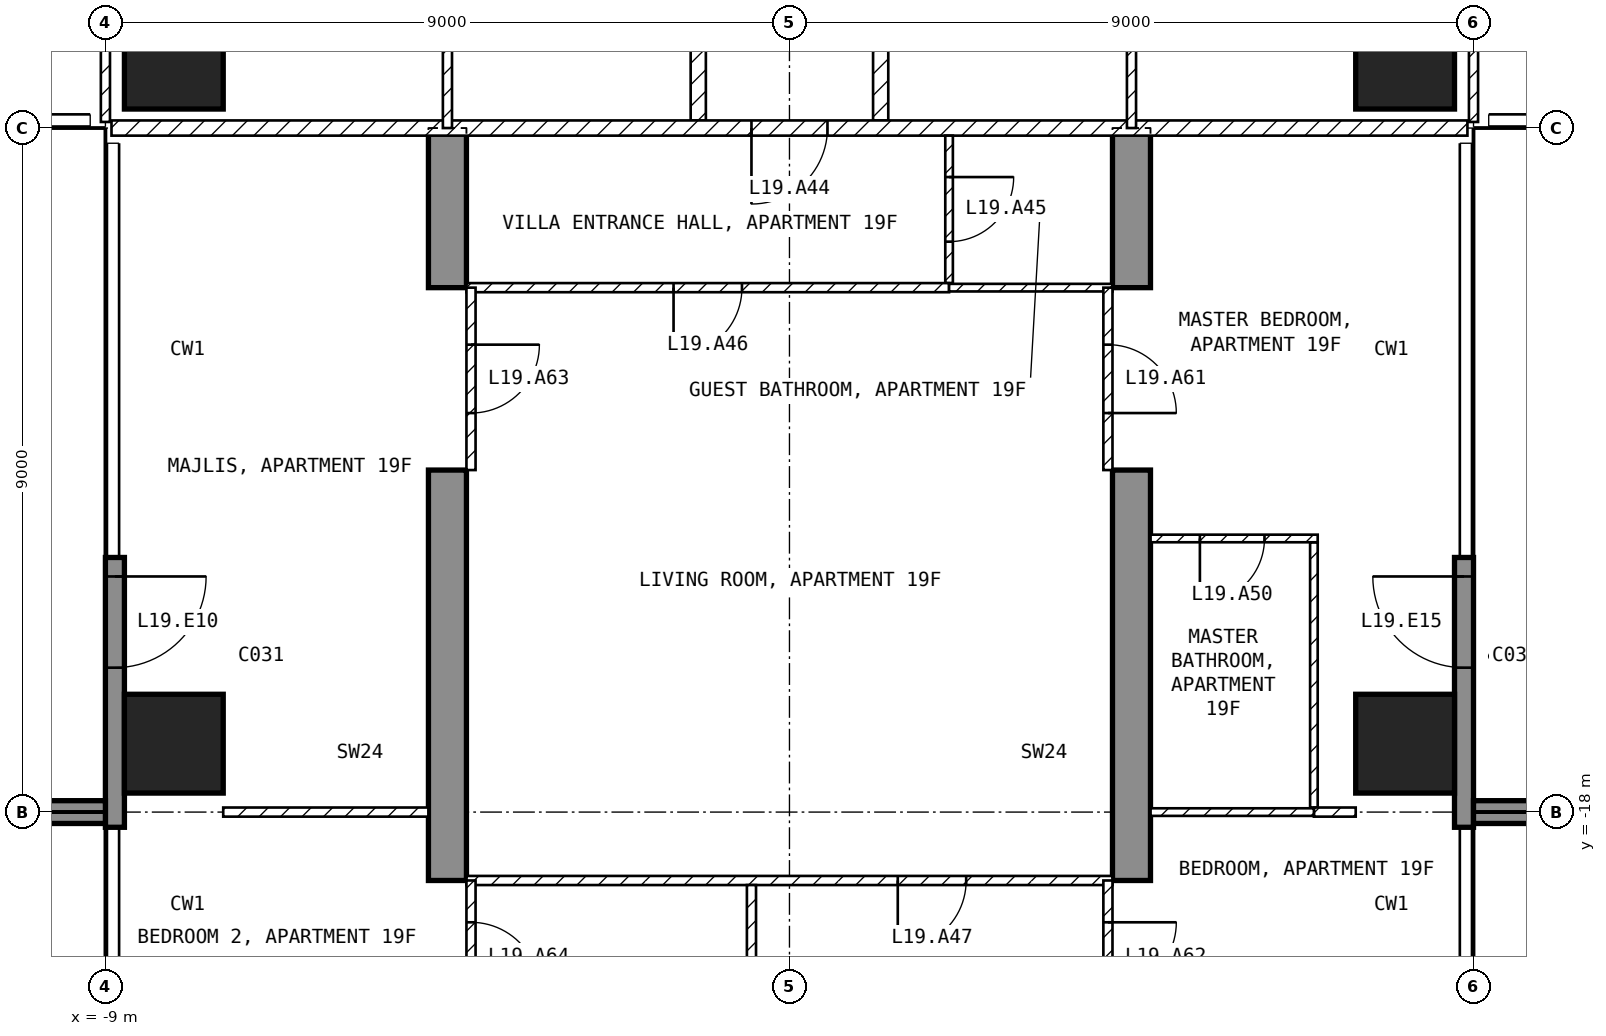
"""IFC4 building model, lengths in metres.
Left out: names, types, materials, properties, quantities, classifications, styles, units other than length and angle.
Written with IfcOpenShell. Run it as: python <this file> out.ifc"""

import sys

from ifc_helpers import new_model, si_unit, direction, frame, frame_2d, origin, origin_2d, place, context, subcontext, project, spatial, polyline, rectangle, outline, extrude, element, fill, save


model = new_model("IFC4")
c1 = context("Model", 3, precision=1e-05, world=origin(), true_north=direction((0.0, 1.0)))
c2 = subcontext(c1, "Body", "Model", "MODEL_VIEW")
j1 = project(units=[si_unit("LENGTHUNIT", "METRE"), si_unit("PLANEANGLEUNIT", "RADIAN")], contexts=[c1])
p1 = place(None, origin())
s1 = spatial("IfcSite", under=j1, at=p1, CompositionType="ELEMENT")
p2 = place(p1, origin())
s2 = spatial("IfcBuilding", under=s1, at=p2, CompositionType="ELEMENT")
p3 = place(p2, frame((0.0, 0.0, 85.5)))
s3 = spatial("IfcBuildingStorey", under=s2, at=p3, CompositionType="ELEMENT", Elevation=85.5)
for number, where, z_axis, x_axis in (
    (1, (-8.1, -17.1, -0.25), (0.0, 0.0, 1.0), (1.0, 0.0, 0.0)),
    (2, (-8.1, -8.1, -0.25), (0.0, 0.0, 1.0), (1.0, 0.0, 0.0)),
    (3, (8.1, -17.1, -0.25), (0.0, 0.0, 1.0), (1.0, 0.0, 0.0)),
    (4, (8.1, -8.1, -0.25), (0.0, 0.0, 1.0), (1.0, 0.0, 0.0)),
):
    element("IfcColumn", number, at=place(p3, frame(where, z_axis=z_axis, x_axis=x_axis)), inside=s3, PredefinedType="COLUMN", context=c2, shape_type="SweptSolid", body=[
        extrude(rectangle(XDim=1.3, YDim=1.3, at=origin_2d()), origin(), (0.0, 0.0, 1.0), 3.5),
    ])
for number, where, z_axis, x_axis in (
    (5, (-4.75, -25.45, -0.25), (1.0, 0.0, 0.0), (0.0, 1.0, 0.0)),
    (6, (4.25, -25.45, -0.25), (1.0, 0.0, 0.0), (0.0, 1.0, 0.0)),
):
    element("IfcWall", number, at=place(p3, frame(where, z_axis=z_axis, x_axis=x_axis)), inside=s3, PredefinedType="SHEAR", context=c2, shape_type="SweptSolid", body=[
        extrude(outline(polyline([(0.0, 0.0), (4.15, 0.0), (4.15, 2.65), (6.55, 2.65), (6.55, 0.0), (11.95, 0.0), (11.95, 2.65), (14.35, 2.65), (14.35, 0.0), (16.45, 0.0), (16.45, 3.5), (0.0, 3.5), (0.0, 0.0)])), origin(), (0.0, 0.0, 1.0), 0.5),
    ])
p4 = place(p3, frame((-8.875, -14.65, 0.0), z_axis=(0.0, 0.0, 1.0), x_axis=(0.0, -1.0, 0.0)))
e7 = element("IfcWall", 7, at=p4, inside=s3, PredefinedType="SOLIDWALL", context=c2, shape_type="SweptSolid", body=[
    extrude(rectangle(XDim=3.55, YDim=0.25, at=frame_2d((1.775, 0.0))), origin(), (0.0, 0.0, 1.0), 3.25),
])
p5 = place(p4, frame((0.25, 0.0, 0.0)))
e8 = element("IfcOpeningElement", 8, at=p5, cuts=e7, PredefinedType="OPENING", context=c2, shape_type="SweptSolid", body=[
    extrude(rectangle(XDim=1.2, YDim=2.4, at=frame_2d((0.6, 1.2))), frame((0.0, 0.135, 0.0), z_axis=(0.0, -1.0, 0.0), x_axis=(1.0, 0.0, 0.0)), (0.0, 0.0, 1.0), 0.27),
])
p6 = place(p3, frame((8.875, -18.2, 0.0), z_axis=(0.0, 0.0, 1.0), x_axis=(0.0, 1.0, 0.0)))
e9 = element("IfcWall", 9, at=p6, inside=s3, PredefinedType="SOLIDWALL", context=c2, shape_type="SweptSolid", body=[
    extrude(rectangle(XDim=3.55, YDim=0.25, at=frame_2d((1.775, 0.0))), origin(), (0.0, 0.0, 1.0), 3.25),
])
p7 = place(p6, frame((2.1, 0.0, 0.0)))
e10 = element("IfcOpeningElement", 10, at=p7, cuts=e9, PredefinedType="OPENING", context=c2, shape_type="SweptSolid", body=[
    extrude(rectangle(XDim=1.2, YDim=2.4, at=frame_2d((0.6, 1.2))), frame((0.0, 0.135, 0.0), z_axis=(0.0, -1.0, 0.0), x_axis=(1.0, 0.0, 0.0)), (0.0, 0.0, 1.0), 0.27),
])
for number, where, z_axis, x_axis in (
    (11, (-9.0, -18.0, 0.0), (0.0, 0.0, 1.0), (-1.0, 0.0, 0.0)),
    (12, (9.0, -18.0, 0.0), (0.0, 0.0, 1.0), (1.0, 0.0, 0.0)),
):
    element("IfcWall", number, at=place(p3, frame(where, z_axis=z_axis, x_axis=x_axis)), inside=s3, PredefinedType="SOLIDWALL", context=c2, shape_type="SweptSolid", body=[
        extrude(rectangle(XDim=2.7, YDim=0.3, at=frame_2d((1.35, 0.0))), origin(), (0.0, 0.0, 1.0), 3.25),
    ])
for number, where, z_axis, x_axis in (
    (13, (1.2, -1.3, 0.0), (0.0, 0.0, 1.0), (0.0, -1.0, 0.0)),
    (14, (-1.2, -8.9, 0.0), (0.0, 0.0, 1.0), (0.0, 1.0, 0.0)),
):
    element("IfcWall", number, at=place(p3, frame(where, z_axis=z_axis, x_axis=x_axis)), inside=s3, PredefinedType="PARTITIONING", context=c2, shape_type="SweptSolid", body=[
        extrude(rectangle(XDim=7.6, YDim=0.2, at=frame_2d((3.8, 0.0))), origin(), (0.0, 0.0, 1.0), 3.25),
    ])
p8 = place(p3, frame((8.92, -9.0, 0.0), z_axis=(0.0, 0.0, 1.0), x_axis=(-1.0, 0.0, 0.0)))
e15 = element("IfcWall", 15, at=p8, inside=s3, PredefinedType="PARTITIONING", context=c2, shape_type="SweptSolid", body=[
    extrude(rectangle(XDim=17.84, YDim=0.2, at=frame_2d((8.92, 0.0))), origin(), (0.0, 0.0, 1.0), 3.25),
])
p9 = place(p8, frame((8.42, 0.0, 0.0)))
e16 = element("IfcOpeningElement", 16, at=p9, cuts=e15, PredefinedType="OPENING", context=c2, shape_type="SweptSolid", body=[
    extrude(rectangle(XDim=1.0, YDim=2.1, at=frame_2d((0.5, 1.05))), frame((0.0, 0.11, 0.0), z_axis=(0.0, -1.0, 0.0), x_axis=(1.0, 0.0, 0.0)), (0.0, 0.0, 1.0), 0.22),
])
p10 = place(p3, frame((9.0, -8.92, 0.0), z_axis=(0.0, 0.0, 1.0), x_axis=(0.0, 1.0, 0.0)))
e17 = element("IfcWall", 17, at=p10, inside=s3, PredefinedType="PARTITIONING", context=c2, shape_type="SweptSolid", body=[
    extrude(rectangle(XDim=7.62, YDim=0.12, at=frame_2d((3.81, 0.0))), origin(), (0.0, 0.0, 1.0), 3.25),
])
p11 = place(p10, frame((5.72, 0.0, 0.0)))
e18 = element("IfcOpeningElement", 18, at=p11, cuts=e17, PredefinedType="OPENING", context=c2, shape_type="SweptSolid", body=[
    extrude(rectangle(XDim=0.9, YDim=2.1, at=frame_2d((0.45, 1.05))), frame((0.0, 0.07, 0.0), z_axis=(0.0, -1.0, 0.0), x_axis=(1.0, 0.0, 0.0)), (0.0, 0.0, 1.0), 0.14),
])
p12 = place(p10, frame((2.682, 0.0, 0.0)))
e19 = element("IfcOpeningElement", 19, at=p12, cuts=e17, PredefinedType="OPENING", context=c2, shape_type="SweptSolid", body=[
    extrude(rectangle(XDim=0.9, YDim=2.1, at=frame_2d((0.45, 1.05))), frame((0.0, 0.07, 0.0), z_axis=(0.0, -1.0, 0.0), x_axis=(1.0, 0.0, 0.0)), (0.0, 0.0, 1.0), 0.14),
])
p13 = place(p3, frame((4.5, -9.0, 0.0), z_axis=(0.0, 0.0, 1.0), x_axis=(0.0, 1.0, 0.0)))
e20 = element("IfcWall", 20, at=p13, inside=s3, PredefinedType="PARTITIONING", context=c2, shape_type="SweptSolid", body=[
    extrude(rectangle(XDim=7.7, YDim=0.12, at=frame_2d((3.85, 0.0))), origin(), (0.0, 0.0, 1.0), 3.25),
])
p14 = place(p13, frame((1.812, 0.0, 0.0)))
e21 = element("IfcOpeningElement", 21, at=p14, cuts=e20, PredefinedType="OPENING", context=c2, shape_type="SweptSolid", body=[
    extrude(rectangle(XDim=0.9, YDim=2.1, at=frame_2d((0.45, 1.05))), frame((0.0, 0.07, 0.0), z_axis=(0.0, -1.0, 0.0), x_axis=(1.0, 0.0, 0.0)), (0.0, 0.0, 1.0), 0.14),
])
p15 = place(p3, frame((-9.0, -1.3, 0.0), z_axis=(0.0, 0.0, 1.0), x_axis=(0.0, -1.0, 0.0)))
e22 = element("IfcWall", 22, at=p15, inside=s3, PredefinedType="PARTITIONING", context=c2, shape_type="SweptSolid", body=[
    extrude(rectangle(XDim=7.62, YDim=0.12, at=frame_2d((3.81, 0.0))), origin(), (0.0, 0.0, 1.0), 3.25),
])
p16 = place(p15, frame((4.17, 0.0, 0.0)))
e23 = element("IfcOpeningElement", 23, at=p16, cuts=e22, PredefinedType="OPENING", context=c2, shape_type="SweptSolid", body=[
    extrude(rectangle(XDim=0.9, YDim=2.1, at=frame_2d((0.45, 1.05))), frame((0.0, 0.07, 0.0), z_axis=(0.0, -1.0, 0.0), x_axis=(1.0, 0.0, 0.0)), (0.0, 0.0, 1.0), 0.14),
])
p17 = place(p3, frame((-4.5, -1.3, 0.0), z_axis=(0.0, 0.0, 1.0), x_axis=(0.0, -1.0, 0.0)))
e24 = element("IfcWall", 24, at=p17, inside=s3, PredefinedType="PARTITIONING", context=c2, shape_type="SweptSolid", body=[
    extrude(rectangle(XDim=7.7, YDim=0.12, at=frame_2d((3.85, 0.0))), origin(), (0.0, 0.0, 1.0), 3.25),
])
p18 = place(p17, frame((4.988, 0.0, 0.0)))
e25 = element("IfcOpeningElement", 25, at=p18, cuts=e24, PredefinedType="OPENING", context=c2, shape_type="SweptSolid", body=[
    extrude(rectangle(XDim=0.9, YDim=2.1, at=frame_2d((0.45, 1.05))), frame((0.0, 0.07, 0.0), z_axis=(0.0, -1.0, 0.0), x_axis=(1.0, 0.0, 0.0)), (0.0, 0.0, 1.0), 0.14),
])
p19 = place(p3, frame((2.1, -9.1, 0.0), z_axis=(0.0, 0.0, 1.0), x_axis=(0.0, -1.0, 0.0)))
e26 = element("IfcWall", 26, at=p19, inside=s3, PredefinedType="PARTITIONING", context=c2, shape_type="SweptSolid", body=[
    extrude(rectangle(XDim=1.94, YDim=0.1, at=frame_2d((0.97, 0.0))), origin(), (0.0, 0.0, 1.0), 3.25),
])
p20 = place(p19, frame((0.545, 0.0, 0.0)))
e27 = element("IfcOpeningElement", 27, at=p20, cuts=e26, PredefinedType="OPENING", context=c2, shape_type="SweptSolid", body=[
    extrude(rectangle(XDim=0.85, YDim=2.1, at=frame_2d((0.425, 1.05))), frame((0.0, 0.06, 0.0), z_axis=(0.0, -1.0, 0.0), x_axis=(1.0, 0.0, 0.0)), (0.0, 0.0, 1.0), 0.12),
])
p21 = place(p3, frame((2.1, -11.1, 0.0), z_axis=(0.0, 0.0, 1.0), x_axis=(-1.0, 0.0, 0.0)))
e28 = element("IfcWall", 28, at=p21, inside=s3, PredefinedType="PARTITIONING", context=c2, shape_type="SweptSolid", body=[
    extrude(rectangle(XDim=6.35, YDim=0.12, at=frame_2d((3.175, 0.0))), origin(), (0.0, 0.0, 1.0), 3.25),
])
p22 = place(p21, frame((2.725, 0.0, 0.0)))
e29 = element("IfcOpeningElement", 29, at=p22, cuts=e28, PredefinedType="OPENING", context=c2, shape_type="SweptSolid", body=[
    extrude(rectangle(XDim=0.9, YDim=2.1, at=frame_2d((0.45, 1.05))), frame((0.0, 0.07, 0.0), z_axis=(0.0, -1.0, 0.0), x_axis=(1.0, 0.0, 0.0)), (0.0, 0.0, 1.0), 0.14),
])
p23 = place(p3, frame((4.25, -11.1, 0.0), z_axis=(0.0, 0.0, 1.0), x_axis=(-1.0, 0.0, 0.0)))
e30 = element("IfcWall", 30, at=p23, inside=s3, PredefinedType="PARTITIONING", context=c2, shape_type="SweptSolid", body=[
    extrude(rectangle(XDim=2.15, YDim=0.1, at=frame_2d((1.075, 0.0))), origin(), (0.0, 0.0, 1.0), 3.25),
])
p24 = place(p3, frame((4.25, -18.9, 0.0), z_axis=(0.0, 0.0, 1.0), x_axis=(-1.0, 0.0, 0.0)))
e31 = element("IfcWall", 31, at=p24, inside=s3, PredefinedType="PARTITIONING", context=c2, shape_type="SweptSolid", body=[
    extrude(rectangle(XDim=8.5, YDim=0.12, at=frame_2d((4.25, 0.0))), origin(), (0.0, 0.0, 1.0), 3.25),
])
p25 = place(p24, frame((1.925, 0.0, 0.0)))
e32 = element("IfcOpeningElement", 32, at=p25, cuts=e31, PredefinedType="OPENING", context=c2, shape_type="SweptSolid", body=[
    extrude(rectangle(XDim=0.9, YDim=2.1, at=frame_2d((0.45, 1.05))), frame((0.0, 0.07, 0.0), z_axis=(0.0, -1.0, 0.0), x_axis=(1.0, 0.0, 0.0)), (0.0, 0.0, 1.0), 0.14),
])
p26 = place(p3, frame((-0.5, -23.34, 0.0), z_axis=(0.0, 0.0, 1.0), x_axis=(0.0, 1.0, 0.0)))
e33 = element("IfcWall", 33, at=p26, inside=s3, PredefinedType="PARTITIONING", context=c2, shape_type="SweptSolid", body=[
    extrude(rectangle(XDim=4.38, YDim=0.12, at=frame_2d((2.19, 0.0))), origin(), (0.0, 0.0, 1.0), 3.25),
])
p27 = place(p26, frame((1.74, 0.0, 0.0)))
e34 = element("IfcOpeningElement", 34, at=p27, cuts=e33, PredefinedType="OPENING", context=c2, shape_type="SweptSolid", body=[
    extrude(rectangle(XDim=0.9, YDim=2.1, at=frame_2d((0.45, 1.05))), frame((0.0, 0.07, 0.0), z_axis=(0.0, -1.0, 0.0), x_axis=(1.0, 0.0, 0.0)), (0.0, 0.0, 1.0), 0.14),
])
p28 = place(p3, frame((6.9, -17.94, 0.0), z_axis=(0.0, 0.0, 1.0), x_axis=(0.0, 1.0, 0.0)))
e35 = element("IfcWall", 35, at=p28, inside=s3, PredefinedType="PARTITIONING", context=c2, shape_type="SweptSolid", body=[
    extrude(rectangle(XDim=3.49, YDim=0.1, at=frame_2d((1.745, 0.0))), origin(), (0.0, 0.0, 1.0), 3.25),
])
p29 = place(p3, frame((6.95, -14.4, 0.0), z_axis=(0.0, 0.0, 1.0), x_axis=(-1.0, 0.0, 0.0)))
e36 = element("IfcWall", 36, at=p29, inside=s3, PredefinedType="PARTITIONING", context=c2, shape_type="SweptSolid", body=[
    extrude(rectangle(XDim=2.2, YDim=0.1, at=frame_2d((1.1, 0.0))), origin(), (0.0, 0.0, 1.0), 3.25),
])
p30 = place(p29, frame((0.7, 0.0, 0.0)))
e37 = element("IfcOpeningElement", 37, at=p30, cuts=e36, PredefinedType="OPENING", context=c2, shape_type="SweptSolid", body=[
    extrude(rectangle(XDim=0.85, YDim=2.1, at=frame_2d((0.425, 1.05))), frame((0.0, 0.06, 0.0), z_axis=(0.0, -1.0, 0.0), x_axis=(1.0, 0.0, 0.0)), (0.0, 0.0, 1.0), 0.12),
])
p31 = place(p3, frame((7.45, -18.0, 0.0), z_axis=(0.0, 0.0, 1.0), x_axis=(-1.0, 0.0, 0.0)))
e38 = element("IfcWall", 38, at=p31, inside=s3, PredefinedType="PARTITIONING", context=c2, shape_type="SweptSolid", body=[
    extrude(rectangle(XDim=0.55, YDim=0.12, at=frame_2d((0.275, 0.0))), origin(), (0.0, 0.0, 1.0), 3.25),
])
p32 = place(p3, frame((6.9, -18.0, 0.0), z_axis=(0.0, 0.0, 1.0), x_axis=(-1.0, 0.0, 0.0)))
e39 = element("IfcWall", 39, at=p32, inside=s3, PredefinedType="PARTITIONING", context=c2, shape_type="SweptSolid", body=[
    extrude(rectangle(XDim=2.15, YDim=0.1, at=frame_2d((1.075, 0.0))), origin(), (0.0, 0.0, 1.0), 3.25),
])
p33 = place(p3, frame((-4.75, -18.0, 0.0), z_axis=(0.0, 0.0, 1.0), x_axis=(-1.0, 0.0, 0.0)))
e40 = element("IfcWall", 40, at=p33, inside=s3, PredefinedType="PARTITIONING", context=c2, shape_type="SweptSolid", body=[
    extrude(rectangle(XDim=2.7, YDim=0.12, at=frame_2d((1.35, 0.0))), origin(), (0.0, 0.0, 1.0), 3.25),
])
p34 = place(p3, frame((4.19, -11.1, 0.0), z_axis=(0.0, 0.0, 1.0), x_axis=(0.0, -1.0, 0.0)))
e41 = element("IfcWall", 41, at=p34, inside=s3, PredefinedType="PARTITIONING", context=c2, shape_type="SweptSolid", body=[
    extrude(rectangle(XDim=2.4, YDim=0.12, at=frame_2d((1.2, 0.0))), origin(), (0.0, 0.0, 1.0), 2.4),
])
p35 = place(p34, frame((0.75, 0.0, 0.0)))
e42 = element("IfcOpeningElement", 42, at=p35, cuts=e41, PredefinedType="OPENING", context=c2, shape_type="SweptSolid", body=[
    extrude(rectangle(XDim=0.9, YDim=2.1, at=frame_2d((0.45, 1.05))), frame((0.0, 0.07, 0.0), z_axis=(0.0, -1.0, 0.0), x_axis=(1.0, 0.0, 0.0)), (0.0, 0.0, 1.0), 0.14),
])
p36 = place(p3, frame((4.19, -18.9, 0.0), z_axis=(0.0, 0.0, 1.0), x_axis=(0.0, -1.0, 0.0)))
e43 = element("IfcWall", 43, at=p36, inside=s3, PredefinedType="PARTITIONING", context=c2, shape_type="SweptSolid", body=[
    extrude(rectangle(XDim=2.4, YDim=0.12, at=frame_2d((1.2, 0.0))), origin(), (0.0, 0.0, 1.0), 2.4),
])
p37 = place(p36, frame((0.55, 0.0, 0.0)))
e44 = element("IfcOpeningElement", 44, at=p37, cuts=e43, PredefinedType="OPENING", context=c2, shape_type="SweptSolid", body=[
    extrude(rectangle(XDim=0.9, YDim=2.1, at=frame_2d((0.45, 1.05))), frame((0.0, 0.07, 0.0), z_axis=(0.0, -1.0, 0.0), x_axis=(1.0, 0.0, 0.0)), (0.0, 0.0, 1.0), 0.14),
])
p38 = place(p3, frame((-4.19, -11.1, 0.0), z_axis=(0.0, 0.0, 1.0), x_axis=(0.0, -1.0, 0.0)))
e45 = element("IfcWall", 45, at=p38, inside=s3, PredefinedType="PARTITIONING", context=c2, shape_type="SweptSolid", body=[
    extrude(rectangle(XDim=2.4, YDim=0.12, at=frame_2d((1.2, 0.0))), origin(), (0.0, 0.0, 1.0), 2.4),
])
p39 = place(p38, frame((0.75, 0.0, 0.0)))
e46 = element("IfcOpeningElement", 46, at=p39, cuts=e45, PredefinedType="OPENING", context=c2, shape_type="SweptSolid", body=[
    extrude(rectangle(XDim=0.9, YDim=2.1, at=frame_2d((0.45, 1.05))), frame((0.0, 0.07, 0.0), z_axis=(0.0, -1.0, 0.0), x_axis=(1.0, 0.0, 0.0)), (0.0, 0.0, 1.0), 0.14),
])
p40 = place(p3, frame((-4.19, -18.9, 0.0), z_axis=(0.0, 0.0, 1.0), x_axis=(0.0, -1.0, 0.0)))
e47 = element("IfcWall", 47, at=p40, inside=s3, PredefinedType="PARTITIONING", context=c2, shape_type="SweptSolid", body=[
    extrude(rectangle(XDim=2.4, YDim=0.12, at=frame_2d((1.2, 0.0))), origin(), (0.0, 0.0, 1.0), 2.4),
])
p41 = place(p40, frame((0.55, 0.0, 0.0)))
e48 = element("IfcOpeningElement", 48, at=p41, cuts=e47, PredefinedType="OPENING", context=c2, shape_type="SweptSolid", body=[
    extrude(rectangle(XDim=0.9, YDim=2.1, at=frame_2d((0.45, 1.05))), frame((0.0, 0.07, 0.0), z_axis=(0.0, -1.0, 0.0), x_axis=(1.0, 0.0, 0.0)), (0.0, 0.0, 1.0), 0.14),
])
p42 = place(p5, origin())
e49 = element("IfcDoor", 49, at=p42, inside=s3, OperationType="SINGLE_SWING_LEFT", PredefinedType="DOOR", context=c2, shape_type="SweptSolid", body=[
    extrude(rectangle(XDim=1.2, YDim=2.4, at=frame_2d((0.6, 1.2))), frame((0.0, 0.025, 0.0), z_axis=(0.0, -1.0, 0.0), x_axis=(1.0, 0.0, 0.0)), (0.0, 0.0, 1.0), 0.05),
])
fill(e8, e49)
p43 = place(p7, origin())
e50 = element("IfcDoor", 50, at=p43, inside=s3, OperationType="SINGLE_SWING_RIGHT", PredefinedType="DOOR", context=c2, shape_type="SweptSolid", body=[
    extrude(rectangle(XDim=1.2, YDim=2.4, at=frame_2d((0.6, 1.2))), frame((0.0, 0.025, 0.0), z_axis=(0.0, -1.0, 0.0), x_axis=(1.0, 0.0, 0.0)), (0.0, 0.0, 1.0), 0.05),
])
fill(e10, e50)
p44 = place(p9, origin())
e51 = element("IfcDoor", 51, at=p44, inside=s3, OperationType="SINGLE_SWING_RIGHT", PredefinedType="DOOR", context=c2, shape_type="SweptSolid", body=[
    extrude(rectangle(XDim=1.0, YDim=2.1, at=frame_2d((0.5, 1.05))), frame((0.0, 0.025, 0.0), z_axis=(0.0, -1.0, 0.0), x_axis=(1.0, 0.0, 0.0)), (0.0, 0.0, 1.0), 0.05),
])
fill(e16, e51)
p45 = place(p20, origin())
e52 = element("IfcDoor", 52, at=p45, inside=s3, OperationType="SINGLE_SWING_LEFT", PredefinedType="DOOR", context=c2, shape_type="SweptSolid", body=[
    extrude(rectangle(XDim=0.85, YDim=2.1, at=frame_2d((0.425, 1.05))), frame((0.0, 0.025, 0.0), z_axis=(0.0, -1.0, 0.0), x_axis=(1.0, 0.0, 0.0)), (0.0, 0.0, 1.0), 0.05),
])
fill(e27, e52)
p46 = place(p22, origin())
e53 = element("IfcDoor", 53, at=p46, inside=s3, OperationType="SINGLE_SWING_RIGHT", PredefinedType="DOOR", context=c2, shape_type="SweptSolid", body=[
    extrude(rectangle(XDim=0.9, YDim=2.1, at=frame_2d((0.45, 1.05))), frame((0.0, 0.025, 0.0), z_axis=(0.0, -1.0, 0.0), x_axis=(1.0, 0.0, 0.0)), (0.0, 0.0, 1.0), 0.05),
])
fill(e29, e53)
p47 = place(p25, origin())
e54 = element("IfcDoor", 54, at=p47, inside=s3, OperationType="SINGLE_SWING_RIGHT", PredefinedType="DOOR", context=c2, shape_type="SweptSolid", body=[
    extrude(rectangle(XDim=0.9, YDim=2.1, at=frame_2d((0.45, 1.05))), frame((0.0, 0.025, 0.0), z_axis=(0.0, -1.0, 0.0), x_axis=(1.0, 0.0, 0.0)), (0.0, 0.0, 1.0), 0.05),
])
fill(e32, e54)
p48 = place(p30, origin())
e55 = element("IfcDoor", 55, at=p48, inside=s3, OperationType="SINGLE_SWING_RIGHT", PredefinedType="DOOR", context=c2, shape_type="SweptSolid", body=[
    extrude(rectangle(XDim=0.85, YDim=2.1, at=frame_2d((0.425, 1.05))), frame((0.0, 0.025, 0.0), z_axis=(0.0, -1.0, 0.0), x_axis=(1.0, 0.0, 0.0)), (0.0, 0.0, 1.0), 0.05),
])
fill(e37, e55)
p49 = place(p35, origin())
e56 = element("IfcDoor", 56, at=p49, inside=s3, OperationType="SINGLE_SWING_RIGHT", PredefinedType="DOOR", context=c2, shape_type="SweptSolid", body=[
    extrude(rectangle(XDim=0.9, YDim=2.1, at=frame_2d((0.45, 1.05))), frame((0.0, 0.025, 0.0), z_axis=(0.0, -1.0, 0.0), x_axis=(1.0, 0.0, 0.0)), (0.0, 0.0, 1.0), 0.05),
])
fill(e42, e56)
p50 = place(p37, origin())
e57 = element("IfcDoor", 57, at=p50, inside=s3, OperationType="SINGLE_SWING_LEFT", PredefinedType="DOOR", context=c2, shape_type="SweptSolid", body=[
    extrude(rectangle(XDim=0.9, YDim=2.1, at=frame_2d((0.45, 1.05))), frame((0.0, 0.025, 0.0), z_axis=(0.0, -1.0, 0.0), x_axis=(1.0, 0.0, 0.0)), (0.0, 0.0, 1.0), 0.05),
])
fill(e44, e57)
p51 = place(p39, origin())
e58 = element("IfcDoor", 58, at=p51, inside=s3, OperationType="SINGLE_SWING_LEFT", PredefinedType="DOOR", context=c2, shape_type="SweptSolid", body=[
    extrude(rectangle(XDim=0.9, YDim=2.1, at=frame_2d((0.45, 1.05))), frame((0.0, 0.025, 0.0), z_axis=(0.0, -1.0, 0.0), x_axis=(1.0, 0.0, 0.0)), (0.0, 0.0, 1.0), 0.05),
])
fill(e46, e58)
p52 = place(p41, origin())
e59 = element("IfcDoor", 59, at=p52, inside=s3, OperationType="SINGLE_SWING_RIGHT", PredefinedType="DOOR", context=c2, shape_type="SweptSolid", body=[
    extrude(rectangle(XDim=0.9, YDim=2.1, at=frame_2d((0.45, 1.05))), frame((0.0, 0.025, 0.0), z_axis=(0.0, -1.0, 0.0), x_axis=(1.0, 0.0, 0.0)), (0.0, 0.0, 1.0), 0.05),
])
fill(e48, e59)
save(model, sys.argv[1])
